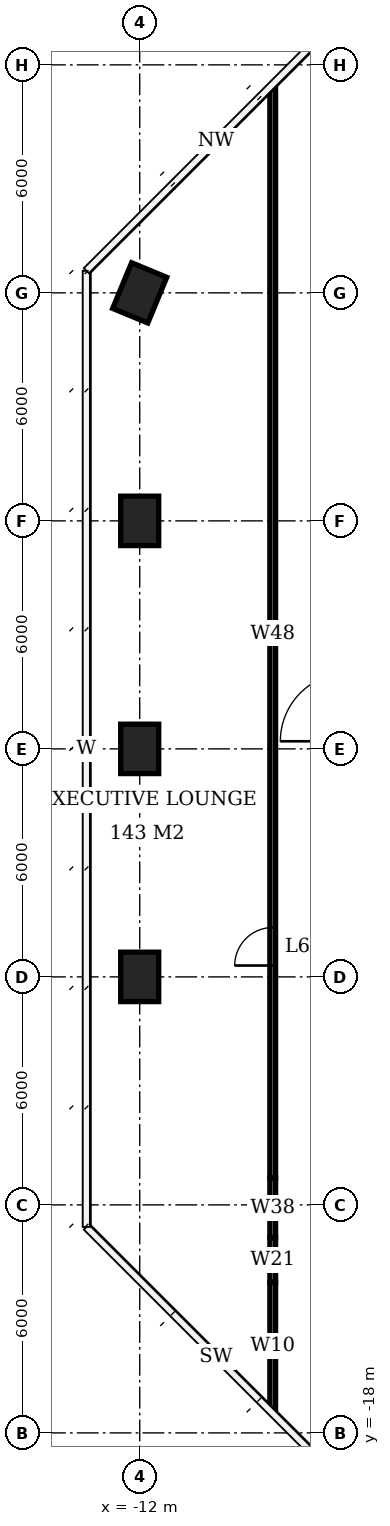
"""IFC4 building model, lengths in metres.
Left out: names, types, materials, properties, quantities, classifications, styles, units other than length and angle.
Written with IfcOpenShell. Run it as: python <this file> out.ifc"""

import sys

from ifc_helpers import new_model, si_unit, direction, frame, frame_2d, origin, origin_2d, place, context, subcontext, project, spatial, rectangle, extrude, element, fill, save


model = new_model("IFC4")
c1 = context("Model", 3, precision=1e-05, world=origin(), true_north=direction((0.0, 1.0)))
c2 = subcontext(c1, "Body", "Model", "MODEL_VIEW")
j1 = project(units=[si_unit("LENGTHUNIT", "METRE"), si_unit("PLANEANGLEUNIT", "RADIAN")], contexts=[c1])
p1 = place(None, origin())
s1 = spatial("IfcSite", under=j1, at=p1, CompositionType="ELEMENT")
p2 = place(p1, origin())
s2 = spatial("IfcBuilding", under=s1, at=p2, CompositionType="ELEMENT")
p3 = place(p2, frame((0.0, 0.0, 276.2)))
s3 = spatial("IfcBuildingStorey", under=s2, at=p3, CompositionType="ELEMENT", Elevation=276.2)
for number, where, z_axis, x_axis in (
    (1, (-12.0, -6.0, 0.0), (0.0, 0.0, 1.0), (0.0, 1.0, 0.0)),
    (2, (-12.0, 0.0, 0.0), (0.0, 0.0, 1.0), (0.0, 1.0, 0.0)),
    (3, (-12.0, 6.0, 0.0), (0.0, 0.0, 1.0), (0.0, 1.0, 0.0)),
    (4, (-12.0, 12.0, 0.0), (0.0, 0.0, 1.0), (0.383, 0.924, 0.0)),
):
    element("IfcColumn", number, at=place(p3, frame(where, z_axis=z_axis, x_axis=x_axis)), inside=s3, PredefinedType="COLUMN", context=c2, shape_type="SweptSolid", body=[
        extrude(rectangle(XDim=1.3, YDim=1.0, at=origin_2d()), origin(), (0.0, 0.0, 1.0), 3.9),
    ])
p4 = place(p3, frame((-8.5, -17.363, 0.0), z_axis=(0.0, 0.0, 1.0), x_axis=(0.0, 1.0, 0.0)))
e5 = element("IfcWall", 5, at=p4, inside=s3, PredefinedType="PARTITIONING", context=c2, shape_type="SweptSolid", body=[
    extrude(rectangle(XDim=3.323, YDim=0.15, at=frame_2d((1.662, 0.0))), origin(), (0.0, 0.0, 1.0), 3.65),
])
p5 = place(p3, frame((-8.5, -14.04, 0.0), z_axis=(0.0, 0.0, 1.0), x_axis=(0.0, 1.0, 0.0)))
e6 = element("IfcWall", 6, at=p5, inside=s3, PredefinedType="PARTITIONING", context=c2, shape_type="SweptSolid", body=[
    extrude(rectangle(XDim=1.18, YDim=0.15, at=frame_2d((0.59, 0.0))), origin(), (0.0, 0.0, 1.0), 2.65),
])
p6 = place(p3, frame((-8.5, -12.86, 0.0), z_axis=(0.0, 0.0, 1.0), x_axis=(0.0, 1.0, 0.0)))
e7 = element("IfcWall", 7, at=p6, inside=s3, PredefinedType="PARTITIONING", context=c2, shape_type="SweptSolid", body=[
    extrude(rectangle(XDim=1.57, YDim=0.15, at=frame_2d((0.785, 0.0))), origin(), (0.0, 0.0, 1.0), 2.65),
])
p7 = place(p3, frame((-8.5, -11.29, 0.0), z_axis=(0.0, 0.0, 1.0), x_axis=(0.0, 1.0, 0.0)))
e8 = element("IfcWall", 8, at=p7, inside=s3, PredefinedType="PARTITIONING", context=c2, shape_type="SweptSolid", body=[
    extrude(rectangle(XDim=28.653, YDim=0.15, at=frame_2d((14.327, 0.0))), origin(), (0.0, 0.0, 1.0), 3.65),
])
p8 = place(p7, frame((5.589, 0.0, 0.0)))
e9 = element("IfcOpeningElement", 9, at=p8, cuts=e8, PredefinedType="OPENING", context=c2, shape_type="SweptSolid", body=[
    extrude(rectangle(XDim=1.0, YDim=2.4, at=frame_2d((0.5, 1.2))), frame((0.0, 0.085, 0.0), z_axis=(0.0, -1.0, 0.0), x_axis=(1.0, 0.0, 0.0)), (0.0, 0.0, 1.0), 0.17),
])
p9 = place(p8, origin())
e10 = element("IfcDoor", 10, at=p9, inside=s3, OperationType="SINGLE_SWING_LEFT", PredefinedType="DOOR", context=c2, shape_type="SweptSolid", body=[
    extrude(rectangle(XDim=1.0, YDim=2.4, at=frame_2d((0.5, 1.2))), frame((0.0, 0.025, 0.0), z_axis=(0.0, -1.0, 0.0), x_axis=(1.0, 0.0, 0.0)), (0.0, 0.0, 1.0), 0.05),
])
fill(e9, e10)
save(model, sys.argv[1])
